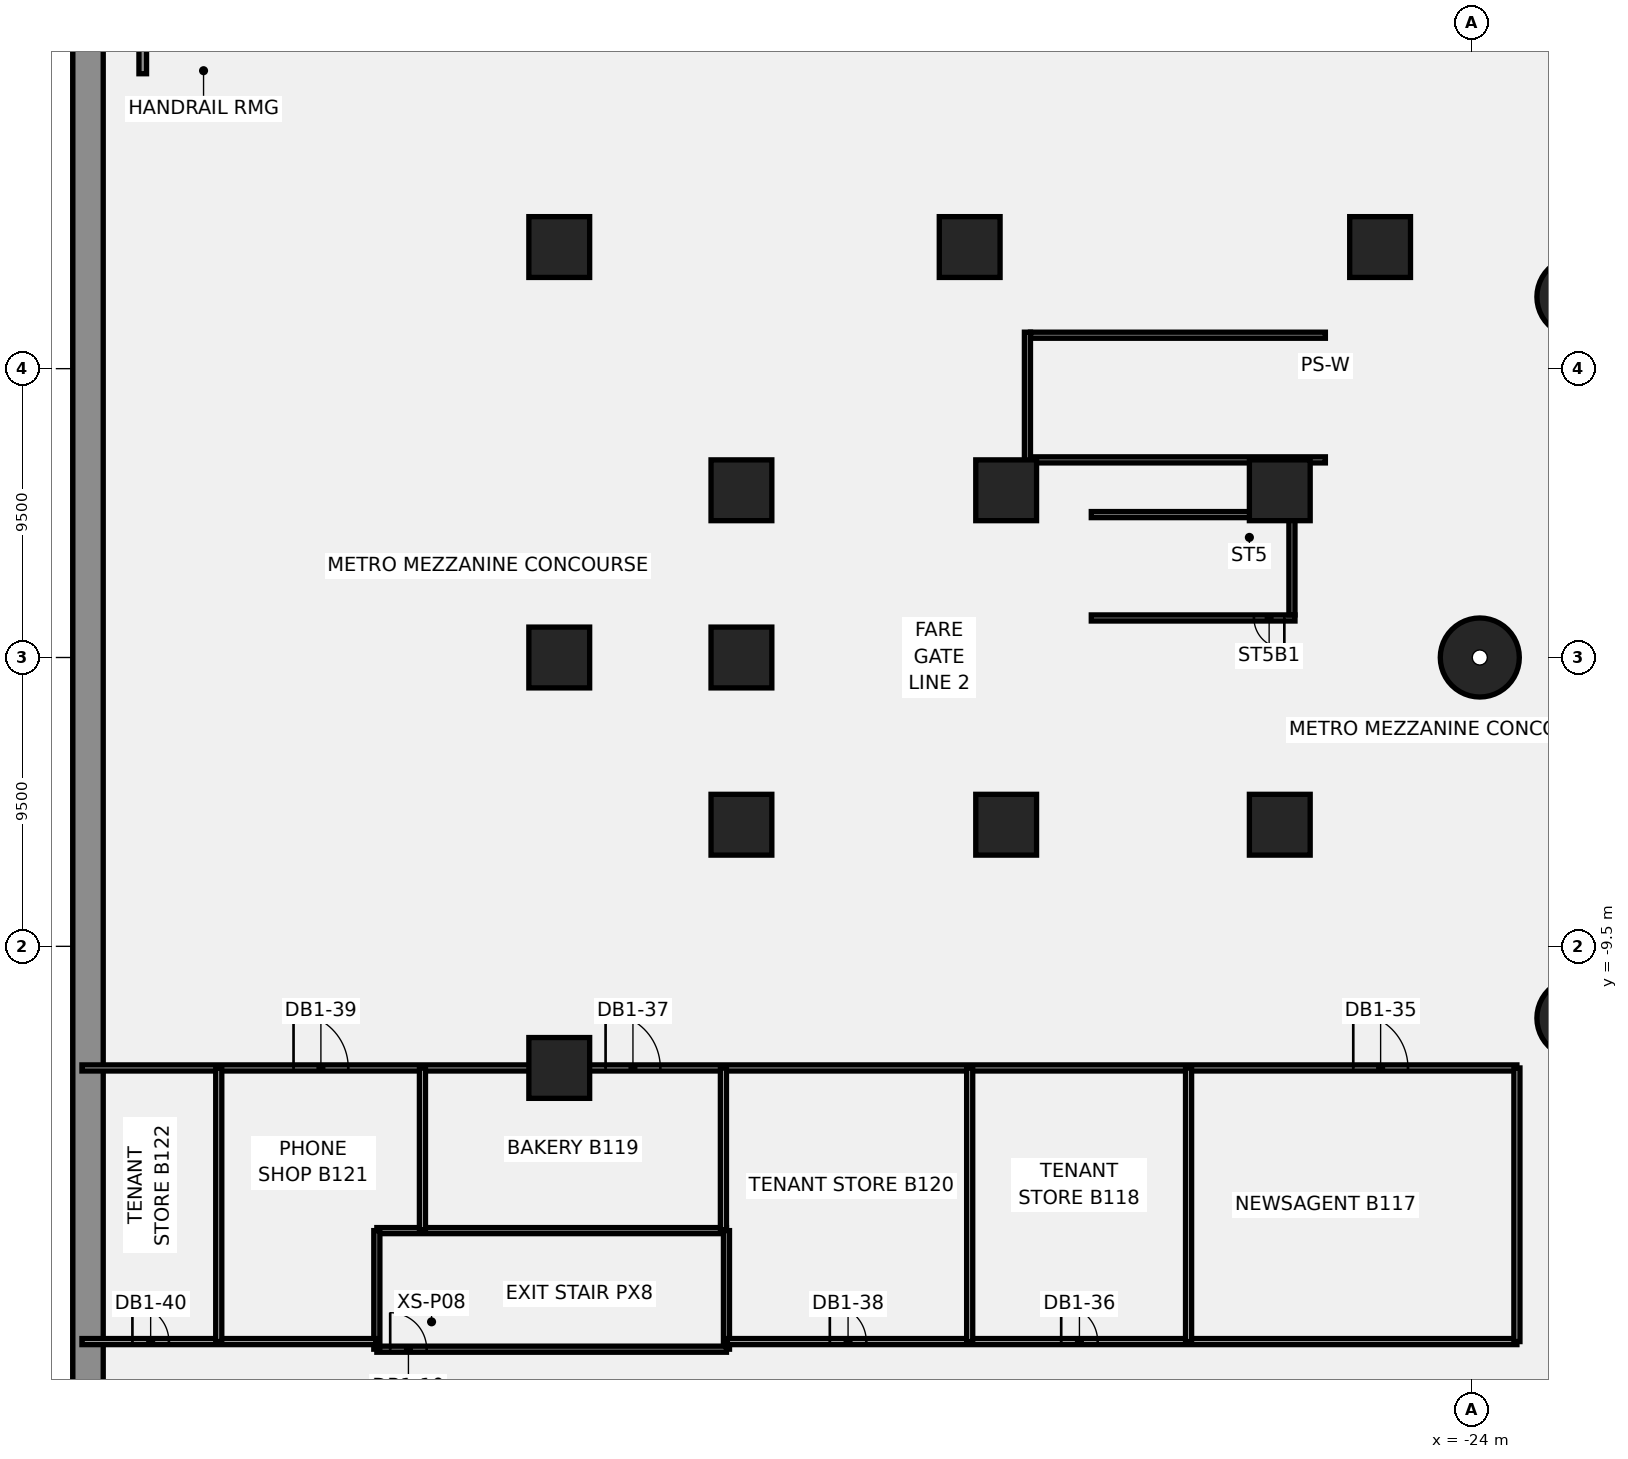
"""IFC4 building model, lengths in metres.
Left out: names, types, materials, properties, quantities, classifications, styles, units other than length and angle.
Written with IfcOpenShell. Run it as: python <this file> out.ifc"""

import sys

from ifc_helpers import new_model, si_unit, direction, frame, frame_2d, origin, origin_2d, place, context, subcontext, project, spatial, polyline, rectangle, circle, outline, extrude, element, fill, save


model = new_model("IFC4")
c1 = context("Model", 3, precision=1e-05, world=origin(), true_north=direction((0.0, 1.0)))
c2 = subcontext(c1, "Body", "Model", "MODEL_VIEW")
j1 = project(units=[si_unit("LENGTHUNIT", "METRE"), si_unit("PLANEANGLEUNIT", "RADIAN")], contexts=[c1])
p1 = place(None, origin())
s1 = spatial("IfcSite", under=j1, at=p1, CompositionType="ELEMENT")
p2 = place(p1, origin())
s2 = spatial("IfcBuilding", under=s1, at=p2, CompositionType="ELEMENT")
p3 = place(p2, frame((0.0, 0.0, -7.0)))
s3 = spatial("IfcBuildingStorey", under=s2, at=p3, CompositionType="ELEMENT", Elevation=-7.0)
p4 = place(p3, frame((-69.5, -53.931, -0.45), z_axis=(0.0, 0.0, 1.0), x_axis=(0.0, 1.0, 0.0)))
e1 = element("IfcWall", 1, at=p4, inside=s3, PredefinedType="SOLIDWALL", context=c2, shape_type="SweptSolid", body=[
    extrude(rectangle(XDim=107.863, YDim=1.0, at=frame_2d((53.931, 0.0))), origin(), (0.0, 0.0, 1.0), 6.9),
])
for number, where, z_axis, x_axis in (
    (2, (-20.543, 11.86, -0.45), (0.0, 0.0, 1.0), (1.0, 0.0, 0.0)),
    (3, (-23.721, 0.0, -0.45), (0.0, 0.0, 1.0), (1.0, 0.0, 0.0)),
    (4, (-20.543, -11.86, -0.45), (0.0, 0.0, 1.0), (1.0, 0.0, 0.0)),
):
    element("IfcColumn", number, at=place(p3, frame(where, z_axis=z_axis, x_axis=x_axis)), inside=s3, PredefinedType="COLUMN", context=c2, shape_type="SweptSolid", body=[
        extrude(circle(Radius=1.3, at=origin_2d()), origin(), (0.0, 0.0, 1.0), 6.9),
    ])
for number, where, z_axis, x_axis in (
    (5, (-39.3, -5.5, -0.45), (0.0, 0.0, 1.0), (1.0, 0.0, 0.0)),
    (6, (-39.3, 5.5, -0.45), (0.0, 0.0, 1.0), (1.0, 0.0, 0.0)),
    (7, (-30.3, -5.5, -0.45), (0.0, 0.0, 1.0), (1.0, 0.0, 0.0)),
    (8, (-30.3, 5.5, -0.45), (0.0, 0.0, 1.0), (1.0, 0.0, 0.0)),
    (9, (-48.008, 5.5, -0.45), (0.0, 0.0, 1.0), (1.0, 0.0, 0.0)),
    (10, (-48.008, 0.0, -0.45), (0.0, 0.0, 1.0), (1.0, 0.0, 0.0)),
    (11, (-48.008, -5.5, -0.45), (0.0, 0.0, 1.0), (1.0, 0.0, 0.0)),
    (12, (-54.0, -13.5, -0.45), (0.0, 0.0, 1.0), (1.0, 0.0, 0.0)),
    (13, (-54.0, 0.0, -0.45), (0.0, 0.0, 1.0), (1.0, 0.0, 0.0)),
    (14, (-54.0, 13.5, -0.45), (0.0, 0.0, 1.0), (1.0, 0.0, 0.0)),
    (15, (-40.5, 13.5, -0.45), (0.0, 0.0, 1.0), (1.0, 0.0, 0.0)),
    (16, (-27.0, 13.5, -0.45), (0.0, 0.0, 1.0), (1.0, 0.0, 0.0)),
):
    element("IfcColumn", number, at=place(p3, frame(where, z_axis=z_axis, x_axis=x_axis)), inside=s3, PredefinedType="COLUMN", context=c2, shape_type="SweptSolid", body=[
        extrude(rectangle(XDim=2.0, YDim=2.0, at=origin_2d()), origin(), (0.0, 0.0, 1.0), 6.9),
    ])
p5 = place(p3, frame((-60.0, -18.85, 0.0), z_axis=(0.0, 0.0, 1.0), x_axis=(1.0, 0.0, 0.0)))
e17 = element("IfcWall", 17, at=p5, inside=s3, PredefinedType="PARTITIONING", context=c2, shape_type="SweptSolid", body=[
    extrude(rectangle(XDim=11.5, YDim=0.2, at=frame_2d((5.75, 0.0))), origin(), (0.0, 0.0, 1.0), 6.45),
])
p6 = place(p3, frame((-48.5, -22.75, 0.0), z_axis=(0.0, 0.0, 1.0), x_axis=(0.0, 1.0, 0.0)))
e18 = element("IfcWall", 18, at=p6, inside=s3, PredefinedType="PARTITIONING", context=c2, shape_type="SweptSolid", body=[
    extrude(rectangle(XDim=3.9, YDim=0.2, at=frame_2d((1.95, 0.0))), origin(), (0.0, 0.0, 1.0), 6.45),
])
p7 = place(p3, frame((-60.0, -22.75, 0.0), z_axis=(0.0, 0.0, 1.0), x_axis=(1.0, 0.0, 0.0)))
e19 = element("IfcWall", 19, at=p7, inside=s3, PredefinedType="PARTITIONING", context=c2, shape_type="SweptSolid", body=[
    extrude(rectangle(XDim=11.5, YDim=0.2, at=frame_2d((5.75, 0.0))), origin(), (0.0, 0.0, 1.0), 6.45),
])
p8 = place(p7, frame((0.439, 0.0, 0.0)))
e20 = element("IfcOpeningElement", 20, at=p8, cuts=e19, PredefinedType="OPENING", context=c2, shape_type="SweptSolid", body=[
    extrude(rectangle(XDim=1.2, YDim=2.1, at=frame_2d((0.6, 1.05))), frame((0.0, 0.11, 0.0), z_axis=(0.0, -1.0, 0.0), x_axis=(1.0, 0.0, 0.0)), (0.0, 0.0, 1.0), 0.22),
])
p9 = place(p3, frame((-60.0, -22.75, 0.0), z_axis=(0.0, 0.0, 1.0), x_axis=(0.0, 1.0, 0.0)))
e21 = element("IfcWall", 21, at=p9, inside=s3, PredefinedType="PARTITIONING", context=c2, shape_type="SweptSolid", body=[
    extrude(rectangle(XDim=3.9, YDim=0.2, at=frame_2d((1.95, 0.0))), origin(), (0.0, 0.0, 1.0), 6.45),
])
p10 = place(p3, frame((-69.699, -22.5, 0.0), z_axis=(0.0, 0.0, 1.0), x_axis=(1.0, 0.0, 0.0)))
e22 = element("IfcWall", 22, at=p10, inside=s3, PredefinedType="PARTITIONING", context=c2, shape_type="SweptSolid", body=[
    extrude(rectangle(XDim=9.669, YDim=0.2, at=frame_2d((4.834, 0.0))), origin(), (0.0, 0.0, 1.0), 6.45),
])
p11 = place(p10, frame((1.659, 0.0, 0.0)))
e23 = element("IfcOpeningElement", 23, at=p11, cuts=e22, PredefinedType="OPENING", context=c2, shape_type="SweptSolid", body=[
    extrude(rectangle(XDim=1.2, YDim=2.1, at=frame_2d((0.6, 1.05))), frame((0.0, 0.11, 0.0), z_axis=(0.0, -1.0, 0.0), x_axis=(1.0, 0.0, 0.0)), (0.0, 0.0, 1.0), 0.22),
])
p12 = place(p3, frame((-69.699, -13.5, 0.0), z_axis=(0.0, 0.0, 1.0), x_axis=(1.0, 0.0, 0.0)))
e24 = element("IfcWall", 24, at=p12, inside=s3, PredefinedType="PARTITIONING", context=c2, shape_type="SweptSolid", body=[
    extrude(rectangle(XDim=47.199, YDim=0.2, at=frame_2d((23.6, 0.0))), origin(), (0.0, 0.0, 1.0), 6.45),
])
p13 = place(p12, frame((41.816, 0.0, 0.0)))
e25 = element("IfcOpeningElement", 25, at=p13, cuts=e24, PredefinedType="OPENING", context=c2, shape_type="SweptSolid", body=[
    extrude(rectangle(XDim=1.8, YDim=2.1, at=frame_2d((0.9, 1.05))), frame((0.0, 0.11, 0.0), z_axis=(0.0, -1.0, 0.0), x_axis=(1.0, 0.0, 0.0)), (0.0, 0.0, 1.0), 0.22),
])
p14 = place(p12, frame((17.223, 0.0, 0.0)))
e26 = element("IfcOpeningElement", 26, at=p14, cuts=e24, PredefinedType="OPENING", context=c2, shape_type="SweptSolid", body=[
    extrude(rectangle(XDim=1.8, YDim=2.1, at=frame_2d((0.9, 1.05))), frame((0.0, 0.11, 0.0), z_axis=(0.0, -1.0, 0.0), x_axis=(1.0, 0.0, 0.0)), (0.0, 0.0, 1.0), 0.22),
])
p15 = place(p12, frame((6.959, 0.0, 0.0)))
e27 = element("IfcOpeningElement", 27, at=p15, cuts=e24, PredefinedType="OPENING", context=c2, shape_type="SweptSolid", body=[
    extrude(rectangle(XDim=1.8, YDim=2.1, at=frame_2d((0.9, 1.05))), frame((0.0, 0.11, 0.0), z_axis=(0.0, -1.0, 0.0), x_axis=(1.0, 0.0, 0.0)), (0.0, 0.0, 1.0), 0.22),
])
p16 = place(p3, frame((-65.2, -22.5, 0.0), z_axis=(0.0, 0.0, 1.0), x_axis=(0.0, 1.0, 0.0)))
e28 = element("IfcWall", 28, at=p16, inside=s3, PredefinedType="PARTITIONING", context=c2, shape_type="SweptSolid", body=[
    extrude(rectangle(XDim=9.0, YDim=0.2, at=frame_2d((4.5, 0.0))), origin(), (0.0, 0.0, 1.0), 6.45),
])
for number, where, z_axis, x_axis in (
    (29, (-58.5, -18.82, 0.0), (0.0, 0.0, 1.0), (0.0, 1.0, 0.0)),
    (30, (-48.6, -18.82, 0.0), (0.0, 0.0, 1.0), (0.0, 1.0, 0.0)),
):
    element("IfcWall", number, at=place(p3, frame(where, z_axis=z_axis, x_axis=x_axis)), inside=s3, PredefinedType="PARTITIONING", context=c2, shape_type="SweptSolid", body=[
        extrude(rectangle(XDim=5.32, YDim=0.2, at=frame_2d((2.66, 0.0))), origin(), (0.0, 0.0, 1.0), 6.45),
    ])
p17 = place(p3, frame((-48.47, -22.5, 0.0), z_axis=(0.0, 0.0, 1.0), x_axis=(1.0, 0.0, 0.0)))
e31 = element("IfcWall", 31, at=p17, inside=s3, PredefinedType="PARTITIONING", context=c2, shape_type="SweptSolid", body=[
    extrude(rectangle(XDim=25.97, YDim=0.2, at=frame_2d((12.985, 0.0))), origin(), (0.0, 0.0, 1.0), 6.45),
])
p18 = place(p17, frame((10.98, 0.0, 0.0)))
e32 = element("IfcOpeningElement", 32, at=p18, cuts=e31, PredefinedType="OPENING", context=c2, shape_type="SweptSolid", body=[
    extrude(rectangle(XDim=1.2, YDim=2.1, at=frame_2d((0.6, 1.05))), frame((0.0, 0.11, 0.0), z_axis=(0.0, -1.0, 0.0), x_axis=(1.0, 0.0, 0.0)), (0.0, 0.0, 1.0), 0.22),
])
p19 = place(p17, frame((3.37, 0.0, 0.0)))
e33 = element("IfcOpeningElement", 33, at=p19, cuts=e31, PredefinedType="OPENING", context=c2, shape_type="SweptSolid", body=[
    extrude(rectangle(XDim=1.2, YDim=2.1, at=frame_2d((0.6, 1.05))), frame((0.0, 0.11, 0.0), z_axis=(0.0, -1.0, 0.0), x_axis=(1.0, 0.0, 0.0)), (0.0, 0.0, 1.0), 0.22),
])
for number, where, z_axis, x_axis in (
    (34, (-40.5, -22.5, 0.0), (0.0, 0.0, 1.0), (0.0, 1.0, 0.0)),
    (35, (-22.5, -22.5, 0.0), (0.0, 0.0, 1.0), (0.0, 1.0, 0.0)),
    (36, (-33.3, -22.5, 0.0), (0.0, 0.0, 1.0), (0.0, 1.0, 0.0)),
):
    element("IfcWall", number, at=place(p3, frame(where, z_axis=z_axis, x_axis=x_axis)), inside=s3, PredefinedType="PARTITIONING", context=c2, shape_type="SweptSolid", body=[
        extrude(rectangle(XDim=9.0, YDim=0.2, at=frame_2d((4.5, 0.0))), origin(), (0.0, 0.0, 1.0), 6.45),
    ])
for number, where, z_axis, x_axis in (
    (37, (-28.8, 10.6, 0.0), (0.0, 0.0, 1.0), (-1.0, 0.0, 0.0)),
    (38, (-28.8, 6.5, 0.0), (0.0, 0.0, 1.0), (-1.0, 0.0, 0.0)),
):
    element("IfcWall", number, at=place(p3, frame(where, z_axis=z_axis, x_axis=x_axis)), inside=s3, PredefinedType="SOLIDWALL", context=c2, shape_type="SweptSolid", body=[
        extrude(rectangle(XDim=9.7, YDim=0.2, at=frame_2d((4.85, 0.0))), origin(), (0.0, 0.0, 1.0), 6.45),
    ])
p20 = place(p3, frame((-38.6, 10.7, 0.0), z_axis=(0.0, 0.0, 1.0), x_axis=(0.0, -1.0, 0.0)))
e39 = element("IfcWall", 39, at=p20, inside=s3, PredefinedType="SOLIDWALL", context=c2, shape_type="SweptSolid", body=[
    extrude(rectangle(XDim=4.3, YDim=0.2, at=frame_2d((2.15, 0.0))), origin(), (0.0, 0.0, 1.0), 6.45),
])
p21 = place(p3, frame((-67.7, 19.2, 0.0), z_axis=(0.0, 0.0, 1.0), x_axis=(0.0, 1.0, 0.0)))
e40 = element("IfcWall", 40, at=p21, inside=s3, PredefinedType="SOLIDWALL", context=c2, shape_type="SweptSolid", body=[
    extrude(rectangle(XDim=6.6, YDim=0.25, at=frame_2d((3.3, 0.0))), origin(), (0.0, 0.0, 1.0), 6.483),
])
p22 = place(p3, frame((-29.8, 1.3, 0.0), z_axis=(0.0, 0.0, 1.0), x_axis=(-1.0, 0.0, 0.0)))
e41 = element("IfcWall", 41, at=p22, inside=s3, PredefinedType="SHEAR", context=c2, shape_type="SweptSolid", body=[
    extrude(rectangle(XDim=6.7, YDim=0.2, at=frame_2d((3.35, 0.0))), origin(), (0.0, 0.0, 1.0), 6.45),
])
p23 = place(p22, frame((0.35, 0.0, 0.0)))
e42 = element("IfcOpeningElement", 42, at=p23, cuts=e41, PredefinedType="OPENING", context=c2, shape_type="SweptSolid", body=[
    extrude(rectangle(XDim=1.0, YDim=2.1, at=frame_2d((0.5, 1.05))), frame((0.0, 0.11, 0.0), z_axis=(0.0, -1.0, 0.0), x_axis=(1.0, 0.0, 0.0)), (0.0, 0.0, 1.0), 0.22),
])
p24 = place(p3, frame((-29.8, 4.7, 0.0), z_axis=(0.0, 0.0, 1.0), x_axis=(-1.0, 0.0, 0.0)))
e43 = element("IfcWall", 43, at=p24, inside=s3, PredefinedType="SHEAR", context=c2, shape_type="SweptSolid", body=[
    extrude(rectangle(XDim=6.7, YDim=0.2, at=frame_2d((3.35, 0.0))), origin(), (0.0, 0.0, 1.0), 6.45),
])
p25 = place(p3, frame((-29.9, 4.6, 0.0), z_axis=(0.0, 0.0, 1.0), x_axis=(0.0, -1.0, 0.0)))
e44 = element("IfcWall", 44, at=p25, inside=s3, PredefinedType="SHEAR", context=c2, shape_type="SweptSolid", body=[
    extrude(rectangle(XDim=3.2, YDim=0.2, at=frame_2d((1.6, 0.0))), origin(), (0.0, 0.0, 1.0), 6.45),
])
p26 = place(p3, origin())
e45 = element("IfcWall", 45, at=p26, inside=s3, PredefinedType="SHEAR", context=c2, shape_type="SweptSolid", body=[
    extrude(outline(polyline([(-36.3, 4.6), (-36.5, 4.6), (-36.5, 1.4), (-36.3, 1.4), (-36.3, 4.6)])), origin(), (0.0, 0.0, 1.0), 6.45),
])
p27 = place(p8, origin())
e46 = element("IfcDoor", 46, at=p27, inside=s3, OperationType="SINGLE_SWING_RIGHT", PredefinedType="DOOR", context=c2, shape_type="SweptSolid", body=[
    extrude(rectangle(XDim=1.2, YDim=2.1, at=frame_2d((0.6, 1.05))), frame((0.0, 0.025, 0.0), z_axis=(0.0, -1.0, 0.0), x_axis=(1.0, 0.0, 0.0)), (0.0, 0.0, 1.0), 0.05),
])
fill(e20, e46)
p28 = place(p13, origin())
e47 = element("IfcDoor", 47, at=p28, inside=s3, OperationType="SINGLE_SWING_LEFT", PredefinedType="DOOR", context=c2, shape_type="SweptSolid", body=[
    extrude(rectangle(XDim=1.8, YDim=2.1, at=frame_2d((0.9, 1.05))), frame((0.0, 0.025, 0.0), z_axis=(0.0, -1.0, 0.0), x_axis=(1.0, 0.0, 0.0)), (0.0, 0.0, 1.0), 0.05),
])
fill(e25, e47)
p29 = place(p18, origin())
e48 = element("IfcDoor", 48, at=p29, inside=s3, OperationType="SINGLE_SWING_RIGHT", PredefinedType="DOOR", context=c2, shape_type="SweptSolid", body=[
    extrude(rectangle(XDim=1.2, YDim=2.1, at=frame_2d((0.6, 1.05))), frame((0.0, 0.025, 0.0), z_axis=(0.0, -1.0, 0.0), x_axis=(1.0, 0.0, 0.0)), (0.0, 0.0, 1.0), 0.05),
])
fill(e32, e48)
p30 = place(p14, origin())
e49 = element("IfcDoor", 49, at=p30, inside=s3, OperationType="SINGLE_SWING_LEFT", PredefinedType="DOOR", context=c2, shape_type="SweptSolid", body=[
    extrude(rectangle(XDim=1.8, YDim=2.1, at=frame_2d((0.9, 1.05))), frame((0.0, 0.025, 0.0), z_axis=(0.0, -1.0, 0.0), x_axis=(1.0, 0.0, 0.0)), (0.0, 0.0, 1.0), 0.05),
])
fill(e26, e49)
p31 = place(p19, origin())
e50 = element("IfcDoor", 50, at=p31, inside=s3, OperationType="SINGLE_SWING_RIGHT", PredefinedType="DOOR", context=c2, shape_type="SweptSolid", body=[
    extrude(rectangle(XDim=1.2, YDim=2.1, at=frame_2d((0.6, 1.05))), frame((0.0, 0.025, 0.0), z_axis=(0.0, -1.0, 0.0), x_axis=(1.0, 0.0, 0.0)), (0.0, 0.0, 1.0), 0.05),
])
fill(e33, e50)
p32 = place(p15, origin())
e51 = element("IfcDoor", 51, at=p32, inside=s3, OperationType="SINGLE_SWING_LEFT", PredefinedType="DOOR", context=c2, shape_type="SweptSolid", body=[
    extrude(rectangle(XDim=1.8, YDim=2.1, at=frame_2d((0.9, 1.05))), frame((0.0, 0.025, 0.0), z_axis=(0.0, -1.0, 0.0), x_axis=(1.0, 0.0, 0.0)), (0.0, 0.0, 1.0), 0.05),
])
fill(e27, e51)
p33 = place(p11, origin())
e52 = element("IfcDoor", 52, at=p33, inside=s3, OperationType="SINGLE_SWING_RIGHT", PredefinedType="DOOR", context=c2, shape_type="SweptSolid", body=[
    extrude(rectangle(XDim=1.2, YDim=2.1, at=frame_2d((0.6, 1.05))), frame((0.0, 0.025, 0.0), z_axis=(0.0, -1.0, 0.0), x_axis=(1.0, 0.0, 0.0)), (0.0, 0.0, 1.0), 0.05),
])
fill(e23, e52)
p34 = place(p23, origin())
e53 = element("IfcDoor", 53, at=p34, inside=s3, OperationType="SINGLE_SWING_LEFT", PredefinedType="DOOR", context=c2, shape_type="SweptSolid", body=[
    extrude(rectangle(XDim=1.0, YDim=2.1, at=frame_2d((0.5, 1.05))), frame((0.0, 0.025, 0.0), z_axis=(0.0, -1.0, 0.0), x_axis=(1.0, 0.0, 0.0)), (0.0, 0.0, 1.0), 0.05),
])
fill(e42, e53)
save(model, sys.argv[1])
